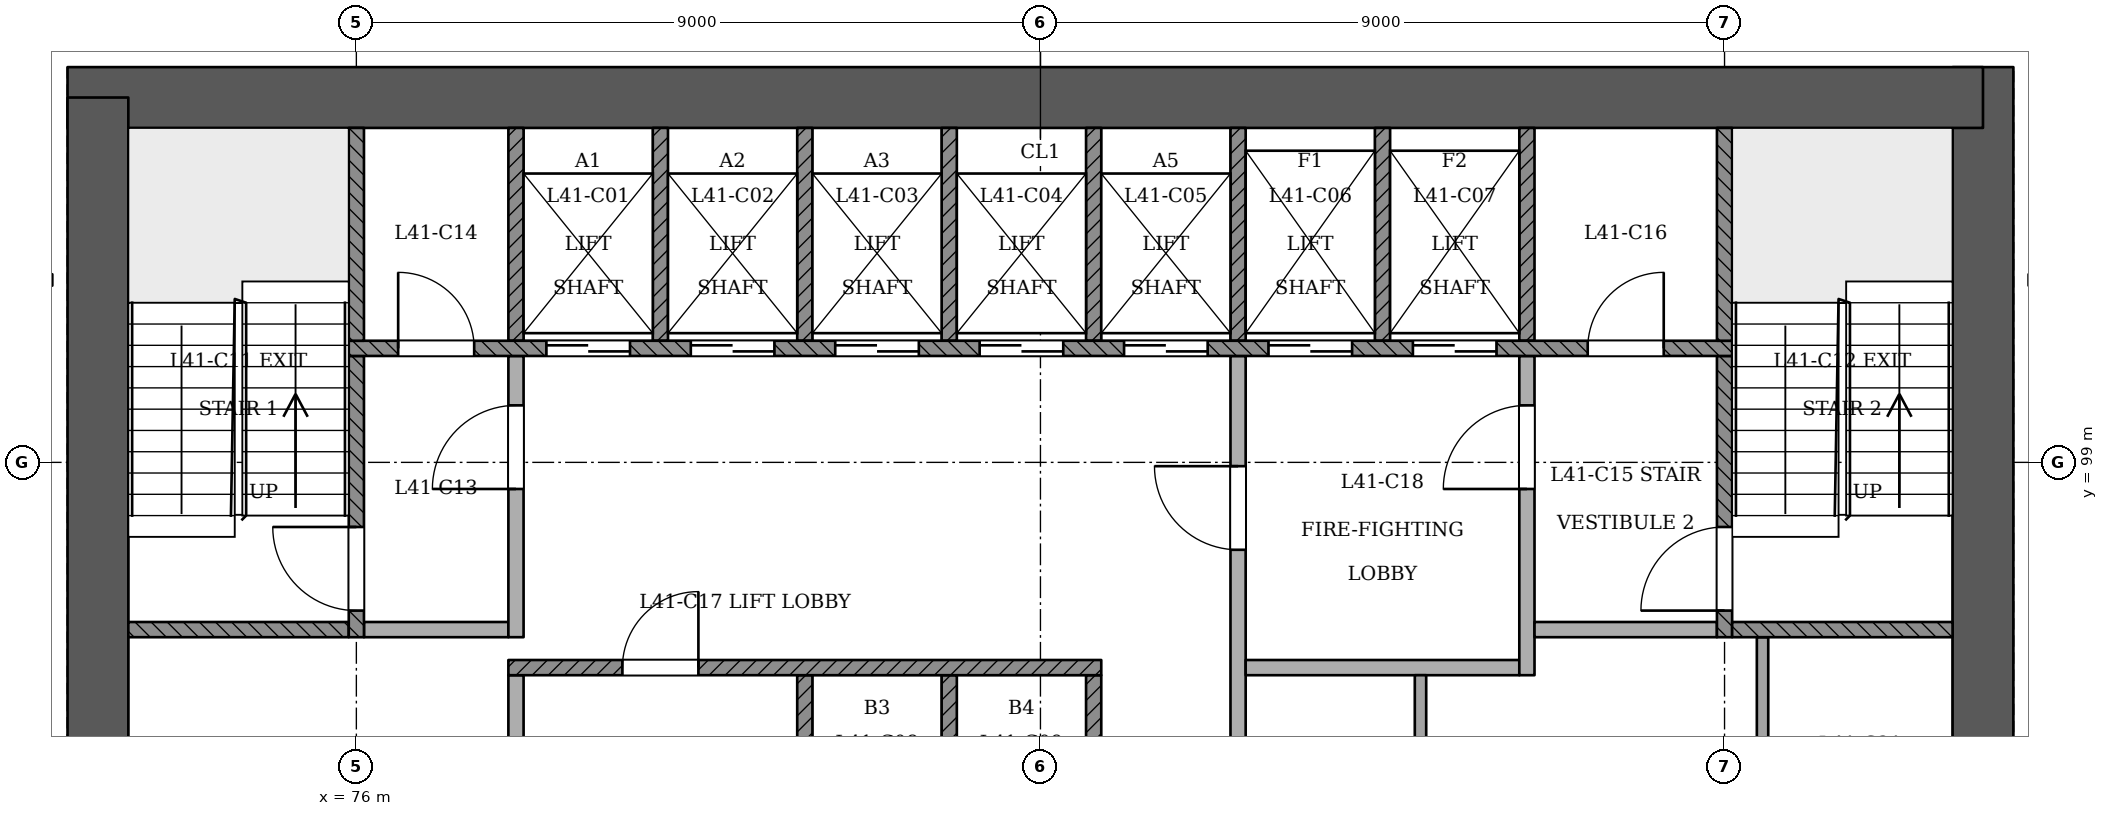
"""IFC4 building model, lengths in metres.
Left out: names, types, materials, properties, quantities, classifications, styles, units other than length and angle.
Written with IfcOpenShell. Run it as: python <this file> out.ifc"""

import sys

from ifc_helpers import new_model, si_unit, direction, frame, frame_2d, origin, place, context, subcontext, project, spatial, rectangle, extrude, element, fill, save


model = new_model("IFC4")
c1 = context("Model", 3, precision=1e-05, world=origin(), true_north=direction((0.0, 1.0)))
c2 = subcontext(c1, "Body", "Model", "MODEL_VIEW")
j1 = project(units=[si_unit("LENGTHUNIT", "METRE"), si_unit("PLANEANGLEUNIT", "RADIAN")], contexts=[c1])
p1 = place(None, origin())
s1 = spatial("IfcSite", under=j1, at=p1, CompositionType="ELEMENT")
p2 = place(p1, origin())
s2 = spatial("IfcBuilding", under=s1, at=p2, CompositionType="ELEMENT")
p3 = place(p2, frame((0.0, 0.0, 160.2)))
s3 = spatial("IfcBuildingStorey", under=s2, at=p3, CompositionType="ELEMENT", Elevation=160.2)
p4 = place(p3, frame((97.4, 93.0, 0.0), z_axis=(0.0, 0.0, 1.0), x_axis=(0.0, 1.0, 0.0)))
e1 = element("IfcWall", 1, at=p4, inside=s3, PredefinedType="SHEAR", context=c2, shape_type="SweptSolid", body=[
    extrude(rectangle(XDim=11.2, YDim=0.8, at=frame_2d((5.6, 0.0))), origin(), (0.0, 0.0, 1.0), 3.6),
])
p5 = place(p3, frame((97.4, 103.8, 0.0), z_axis=(0.0, 0.0, 1.0), x_axis=(-1.0, 0.0, 0.0)))
e2 = element("IfcWall", 2, at=p5, inside=s3, PredefinedType="SHEAR", context=c2, shape_type="SweptSolid", body=[
    extrude(rectangle(XDim=25.2, YDim=0.8, at=frame_2d((12.6, 0.0))), origin(), (0.0, 0.0, 1.0), 3.6),
])
p6 = place(p3, frame((72.6, 103.8, 0.0), z_axis=(0.0, 0.0, 1.0), x_axis=(0.0, -1.0, 0.0)))
e3 = element("IfcWall", 3, at=p6, inside=s3, PredefinedType="SHEAR", context=c2, shape_type="SweptSolid", body=[
    extrude(rectangle(XDim=11.2, YDim=0.8, at=frame_2d((5.6, 0.0))), origin(), (0.0, 0.0, 1.0), 3.6),
])
p7 = place(p3, frame((78.1, 93.4, 0.0), z_axis=(0.0, 0.0, 1.0), x_axis=(0.0, 1.0, 0.0)))
e4 = element("IfcWall", 4, at=p7, inside=s3, PredefinedType="PARTITIONING", context=c2, shape_type="SweptSolid", body=[
    extrude(rectangle(XDim=2.8, YDim=0.2, at=frame_2d((1.4, 0.0))), origin(), (0.0, 0.0, 1.0), 3.15),
])
for number, where, z_axis, x_axis in (
    (5, (81.9, 93.4, 0.0), (0.0, 0.0, 1.0), (0.0, 1.0, 0.0)),
    (6, (83.8, 93.4, 0.0), (0.0, 0.0, 1.0), (0.0, 1.0, 0.0)),
    (7, (85.7, 93.4, 0.0), (0.0, 0.0, 1.0), (0.0, 1.0, 0.0)),
):
    element("IfcWall", number, at=place(p3, frame(where, z_axis=z_axis, x_axis=x_axis)), inside=s3, PredefinedType="SOLIDWALL", context=c2, shape_type="SweptSolid", body=[
        extrude(rectangle(XDim=2.8, YDim=0.2, at=frame_2d((1.4, 0.0))), origin(), (0.0, 0.0, 1.0), 3.15),
    ])
p8 = place(p3, frame((87.6, 93.4, 0.0), z_axis=(0.0, 0.0, 1.0), x_axis=(0.0, 1.0, 0.0)))
e8 = element("IfcWall", 8, at=p8, inside=s3, PredefinedType="PARTITIONING", context=c2, shape_type="SweptSolid", body=[
    extrude(rectangle(XDim=7.0, YDim=0.2, at=frame_2d((3.5, 0.0))), origin(), (0.0, 0.0, 1.0), 3.15),
])
p9 = place(p8, frame((4.45, 0.0, 0.0)))
e9 = element("IfcOpeningElement", 9, at=p9, cuts=e8, PredefinedType="OPENING", context=c2, shape_type="SweptSolid", body=[
    extrude(rectangle(XDim=1.1, YDim=2.1, at=frame_2d((0.55, 1.05))), frame((0.0, 0.11, 0.0), z_axis=(0.0, -1.0, 0.0), x_axis=(1.0, 0.0, 0.0)), (0.0, 0.0, 1.0), 0.221),
])
p10 = place(p3, frame((90.0, 93.4, 0.0), z_axis=(0.0, 0.0, 1.0), x_axis=(0.0, 1.0, 0.0)))
e10 = element("IfcWall", 10, at=p10, inside=s3, PredefinedType="PARTITIONING", context=c2, shape_type="SweptSolid", body=[
    extrude(rectangle(XDim=2.8, YDim=0.15, at=frame_2d((1.4, 0.0))), origin(), (0.0, 0.0, 1.0), 3.15),
])
p11 = place(p3, frame((94.5, 93.4, 0.0), z_axis=(0.0, 0.0, 1.0), x_axis=(0.0, 1.0, 0.0)))
e11 = element("IfcWall", 11, at=p11, inside=s3, PredefinedType="PARTITIONING", context=c2, shape_type="SweptSolid", body=[
    extrude(rectangle(XDim=3.3, YDim=0.15, at=frame_2d((1.65, 0.0))), origin(), (0.0, 0.0, 1.0), 3.15),
])
p12 = place(p3, frame((78.0, 96.3, 0.0), z_axis=(0.0, 0.0, 1.0), x_axis=(1.0, 0.0, 0.0)))
e12 = element("IfcWall", 12, at=p12, inside=s3, PredefinedType="SOLIDWALL", context=c2, shape_type="SweptSolid", body=[
    extrude(rectangle(XDim=7.8, YDim=0.2, at=frame_2d((3.9, 0.0))), origin(), (0.0, 0.0, 1.0), 3.15),
])
p13 = place(p12, frame((1.5, 0.0, 0.0)))
e13 = element("IfcOpeningElement", 13, at=p13, cuts=e12, PredefinedType="OPENING", context=c2, shape_type="SweptSolid", body=[
    extrude(rectangle(XDim=1.0, YDim=2.1, at=frame_2d((0.5, 1.05))), frame((0.0, 0.11, 0.0), z_axis=(0.0, -1.0, 0.0), x_axis=(1.0, 0.0, 0.0)), (0.0, 0.0, 1.0), 0.221),
])
p14 = place(p3, frame((87.7, 96.3, 0.0), z_axis=(0.0, 0.0, 1.0), x_axis=(1.0, 0.0, 0.0)))
e14 = element("IfcWall", 14, at=p14, inside=s3, PredefinedType="PARTITIONING", context=c2, shape_type="SweptSolid", body=[
    extrude(rectangle(XDim=3.6, YDim=0.2, at=frame_2d((1.8, 0.0))), origin(), (0.0, 0.0, 1.0), 3.15),
])
p15 = place(p3, frame((91.4, 96.2, 0.0), z_axis=(0.0, 0.0, 1.0), x_axis=(0.0, 1.0, 0.0)))
e15 = element("IfcWall", 15, at=p15, inside=s3, PredefinedType="PARTITIONING", context=c2, shape_type="SweptSolid", body=[
    extrude(rectangle(XDim=4.2, YDim=0.2, at=frame_2d((2.1, 0.0))), origin(), (0.0, 0.0, 1.0), 3.15),
])
p16 = place(p15, frame((2.45, 0.0, 0.0)))
e16 = element("IfcOpeningElement", 16, at=p16, cuts=e15, PredefinedType="OPENING", context=c2, shape_type="SweptSolid", body=[
    extrude(rectangle(XDim=1.1, YDim=2.1, at=frame_2d((0.55, 1.05))), frame((0.0, 0.11, 0.0), z_axis=(0.0, -1.0, 0.0), x_axis=(1.0, 0.0, 0.0)), (0.0, 0.0, 1.0), 0.221),
])
p17 = place(p3, frame((73.0, 96.8, 0.0), z_axis=(0.0, 0.0, 1.0), x_axis=(1.0, 0.0, 0.0)))
e17 = element("IfcWall", 17, at=p17, inside=s3, PredefinedType="SOLIDWALL", context=c2, shape_type="SweptSolid", body=[
    extrude(rectangle(XDim=2.9, YDim=0.2, at=frame_2d((1.45, 0.0))), origin(), (0.0, 0.0, 1.0), 3.15),
])
p18 = place(p3, frame((76.0, 96.7, 0.0), z_axis=(0.0, 0.0, 1.0), x_axis=(0.0, 1.0, 0.0)))
e18 = element("IfcWall", 18, at=p18, inside=s3, PredefinedType="SOLIDWALL", context=c2, shape_type="SweptSolid", body=[
    extrude(rectangle(XDim=3.7, YDim=0.2, at=frame_2d((1.85, 0.0))), origin(), (0.0, 0.0, 1.0), 3.15),
])
p19 = place(p18, frame((0.35, 0.0, 0.0)))
e19 = element("IfcOpeningElement", 19, at=p19, cuts=e18, PredefinedType="OPENING", context=c2, shape_type="SweptSolid", body=[
    extrude(rectangle(XDim=1.1, YDim=2.1, at=frame_2d((0.55, 1.05))), frame((0.0, 0.11, 0.0), z_axis=(0.0, -1.0, 0.0), x_axis=(1.0, 0.0, 0.0)), (0.0, 0.0, 1.0), 0.221),
])
p20 = place(p3, frame((76.1, 96.8, 0.0), z_axis=(0.0, 0.0, 1.0), x_axis=(1.0, 0.0, 0.0)))
e20 = element("IfcWall", 20, at=p20, inside=s3, PredefinedType="PARTITIONING", context=c2, shape_type="SweptSolid", body=[
    extrude(rectangle(XDim=1.9, YDim=0.2, at=frame_2d((0.95, 0.0))), origin(), (0.0, 0.0, 1.0), 3.15),
])
p21 = place(p3, frame((78.1, 96.7, 0.0), z_axis=(0.0, 0.0, 1.0), x_axis=(0.0, 1.0, 0.0)))
e21 = element("IfcWall", 21, at=p21, inside=s3, PredefinedType="PARTITIONING", context=c2, shape_type="SweptSolid", body=[
    extrude(rectangle(XDim=3.7, YDim=0.2, at=frame_2d((1.85, 0.0))), origin(), (0.0, 0.0, 1.0), 3.15),
])
p22 = place(p21, frame((1.95, 0.0, 0.0)))
e22 = element("IfcOpeningElement", 22, at=p22, cuts=e21, PredefinedType="OPENING", context=c2, shape_type="SweptSolid", body=[
    extrude(rectangle(XDim=1.1, YDim=2.1, at=frame_2d((0.55, 1.05))), frame((0.0, 0.11, 0.0), z_axis=(0.0, -1.0, 0.0), x_axis=(1.0, 0.0, 0.0)), (0.0, 0.0, 1.0), 0.221),
])
p23 = place(p3, frame((91.5, 96.8, 0.0), z_axis=(0.0, 0.0, 1.0), x_axis=(1.0, 0.0, 0.0)))
e23 = element("IfcWall", 23, at=p23, inside=s3, PredefinedType="PARTITIONING", context=c2, shape_type="SweptSolid", body=[
    extrude(rectangle(XDim=2.4, YDim=0.2, at=frame_2d((1.2, 0.0))), origin(), (0.0, 0.0, 1.0), 3.15),
])
p24 = place(p3, frame((94.0, 96.7, 0.0), z_axis=(0.0, 0.0, 1.0), x_axis=(0.0, 1.0, 0.0)))
e24 = element("IfcWall", 24, at=p24, inside=s3, PredefinedType="SOLIDWALL", context=c2, shape_type="SweptSolid", body=[
    extrude(rectangle(XDim=3.7, YDim=0.2, at=frame_2d((1.85, 0.0))), origin(), (0.0, 0.0, 1.0), 3.15),
])
p25 = place(p24, frame((0.35, 0.0, 0.0)))
e25 = element("IfcOpeningElement", 25, at=p25, cuts=e24, PredefinedType="OPENING", context=c2, shape_type="SweptSolid", body=[
    extrude(rectangle(XDim=1.1, YDim=2.1, at=frame_2d((0.55, 1.05))), frame((0.0, 0.11, 0.0), z_axis=(0.0, -1.0, 0.0), x_axis=(1.0, 0.0, 0.0)), (0.0, 0.0, 1.0), 0.221),
])
p26 = place(p3, frame((94.1, 96.8, 0.0), z_axis=(0.0, 0.0, 1.0), x_axis=(1.0, 0.0, 0.0)))
e26 = element("IfcWall", 26, at=p26, inside=s3, PredefinedType="SOLIDWALL", context=c2, shape_type="SweptSolid", body=[
    extrude(rectangle(XDim=2.9, YDim=0.2, at=frame_2d((1.45, 0.0))), origin(), (0.0, 0.0, 1.0), 3.15),
])
p27 = place(p3, frame((75.9, 100.5, 0.0), z_axis=(0.0, 0.0, 1.0), x_axis=(1.0, 0.0, 0.0)))
e27 = element("IfcWall", 27, at=p27, inside=s3, PredefinedType="SOLIDWALL", context=c2, shape_type="SweptSolid", body=[
    extrude(rectangle(XDim=18.2, YDim=0.2, at=frame_2d((9.1, 0.0))), origin(), (0.0, 0.0, 1.0), 3.15),
])
p28 = place(p27, frame((2.6, 0.0, 0.0)))
e28 = element("IfcOpeningElement", 28, at=p28, cuts=e27, PredefinedType="OPENING", context=c2, shape_type="SweptSolid", body=[
    extrude(rectangle(XDim=1.1, YDim=2.1, at=frame_2d((0.55, 1.05))), frame((0.0, 0.11, 0.0), z_axis=(0.0, -1.0, 0.0), x_axis=(1.0, 0.0, 0.0)), (0.0, 0.0, 1.0), 0.221),
])
p29 = place(p27, frame((4.5, 0.0, 0.0)))
e29 = element("IfcOpeningElement", 29, at=p29, cuts=e27, PredefinedType="OPENING", context=c2, shape_type="SweptSolid", body=[
    extrude(rectangle(XDim=1.1, YDim=2.1, at=frame_2d((0.55, 1.05))), frame((0.0, 0.11, 0.0), z_axis=(0.0, -1.0, 0.0), x_axis=(1.0, 0.0, 0.0)), (0.0, 0.0, 1.0), 0.221),
])
p30 = place(p27, frame((6.4, 0.0, 0.0)))
e30 = element("IfcOpeningElement", 30, at=p30, cuts=e27, PredefinedType="OPENING", context=c2, shape_type="SweptSolid", body=[
    extrude(rectangle(XDim=1.1, YDim=2.1, at=frame_2d((0.55, 1.05))), frame((0.0, 0.11, 0.0), z_axis=(0.0, -1.0, 0.0), x_axis=(1.0, 0.0, 0.0)), (0.0, 0.0, 1.0), 0.221),
])
p31 = place(p27, frame((8.3, 0.0, 0.0)))
e31 = element("IfcOpeningElement", 31, at=p31, cuts=e27, PredefinedType="OPENING", context=c2, shape_type="SweptSolid", body=[
    extrude(rectangle(XDim=1.1, YDim=2.1, at=frame_2d((0.55, 1.05))), frame((0.0, 0.11, 0.0), z_axis=(0.0, -1.0, 0.0), x_axis=(1.0, 0.0, 0.0)), (0.0, 0.0, 1.0), 0.221),
])
p32 = place(p27, frame((10.2, 0.0, 0.0)))
e32 = element("IfcOpeningElement", 32, at=p32, cuts=e27, PredefinedType="OPENING", context=c2, shape_type="SweptSolid", body=[
    extrude(rectangle(XDim=1.1, YDim=2.1, at=frame_2d((0.55, 1.05))), frame((0.0, 0.11, 0.0), z_axis=(0.0, -1.0, 0.0), x_axis=(1.0, 0.0, 0.0)), (0.0, 0.0, 1.0), 0.221),
])
p33 = place(p27, frame((12.1, 0.0, 0.0)))
e33 = element("IfcOpeningElement", 33, at=p33, cuts=e27, PredefinedType="OPENING", context=c2, shape_type="SweptSolid", body=[
    extrude(rectangle(XDim=1.1, YDim=2.1, at=frame_2d((0.55, 1.05))), frame((0.0, 0.11, 0.0), z_axis=(0.0, -1.0, 0.0), x_axis=(1.0, 0.0, 0.0)), (0.0, 0.0, 1.0), 0.221),
])
p34 = place(p27, frame((14.0, 0.0, 0.0)))
e34 = element("IfcOpeningElement", 34, at=p34, cuts=e27, PredefinedType="OPENING", context=c2, shape_type="SweptSolid", body=[
    extrude(rectangle(XDim=1.1, YDim=2.1, at=frame_2d((0.55, 1.05))), frame((0.0, 0.11, 0.0), z_axis=(0.0, -1.0, 0.0), x_axis=(1.0, 0.0, 0.0)), (0.0, 0.0, 1.0), 0.221),
])
p35 = place(p27, frame((0.65, 0.0, 0.0)))
e35 = element("IfcOpeningElement", 35, at=p35, cuts=e27, PredefinedType="OPENING", context=c2, shape_type="SweptSolid", body=[
    extrude(rectangle(XDim=1.0, YDim=2.1, at=frame_2d((0.5, 1.05))), frame((0.0, 0.11, 0.0), z_axis=(0.0, -1.0, 0.0), x_axis=(1.0, 0.0, 0.0)), (0.0, 0.0, 1.0), 0.221),
])
p36 = place(p27, frame((16.3, 0.0, 0.0)))
e36 = element("IfcOpeningElement", 36, at=p36, cuts=e27, PredefinedType="OPENING", context=c2, shape_type="SweptSolid", body=[
    extrude(rectangle(XDim=1.0, YDim=2.1, at=frame_2d((0.5, 1.05))), frame((0.0, 0.11, 0.0), z_axis=(0.0, -1.0, 0.0), x_axis=(1.0, 0.0, 0.0)), (0.0, 0.0, 1.0), 0.221),
])
for number, where, z_axis, x_axis in (
    (37, (76.0, 100.6, 0.0), (0.0, 0.0, 1.0), (0.0, 1.0, 0.0)),
    (38, (78.1, 100.6, 0.0), (0.0, 0.0, 1.0), (0.0, 1.0, 0.0)),
    (39, (80.0, 100.6, 0.0), (0.0, 0.0, 1.0), (0.0, 1.0, 0.0)),
    (40, (81.9, 100.6, 0.0), (0.0, 0.0, 1.0), (0.0, 1.0, 0.0)),
    (41, (83.8, 100.6, 0.0), (0.0, 0.0, 1.0), (0.0, 1.0, 0.0)),
    (42, (85.7, 100.6, 0.0), (0.0, 0.0, 1.0), (0.0, 1.0, 0.0)),
    (43, (87.6, 100.6, 0.0), (0.0, 0.0, 1.0), (0.0, 1.0, 0.0)),
    (44, (89.5, 100.6, 0.0), (0.0, 0.0, 1.0), (0.0, 1.0, 0.0)),
    (45, (91.4, 100.6, 0.0), (0.0, 0.0, 1.0), (0.0, 1.0, 0.0)),
    (46, (94.0, 100.6, 0.0), (0.0, 0.0, 1.0), (0.0, 1.0, 0.0)),
):
    element("IfcWall", number, at=place(p3, frame(where, z_axis=z_axis, x_axis=x_axis)), inside=s3, PredefinedType="SOLIDWALL", context=c2, shape_type="SweptSolid", body=[
        extrude(rectangle(XDim=2.8, YDim=0.2, at=frame_2d((1.4, 0.0))), origin(), (0.0, 0.0, 1.0), 3.15),
    ])
p37 = place(p28, origin())
e47 = element("IfcDoor", 47, at=p37, inside=s3, OperationType="SLIDING_TO_RIGHT", PredefinedType="NOTDEFINED", context=c2, shape_type="SweptSolid", body=[
    extrude(rectangle(XDim=1.1, YDim=2.1, at=frame_2d((0.55, 1.05))), frame((0.0, 0.025, 0.0), z_axis=(0.0, -1.0, 0.0), x_axis=(1.0, 0.0, 0.0)), (0.0, 0.0, 1.0), 0.05),
])
fill(e28, e47)
p38 = place(p29, origin())
e48 = element("IfcDoor", 48, at=p38, inside=s3, OperationType="SLIDING_TO_LEFT", PredefinedType="NOTDEFINED", context=c2, shape_type="SweptSolid", body=[
    extrude(rectangle(XDim=1.1, YDim=2.1, at=frame_2d((0.55, 1.05))), frame((0.0, 0.025, 0.0), z_axis=(0.0, -1.0, 0.0), x_axis=(1.0, 0.0, 0.0)), (0.0, 0.0, 1.0), 0.05),
])
fill(e29, e48)
p39 = place(p30, origin())
e49 = element("IfcDoor", 49, at=p39, inside=s3, OperationType="SLIDING_TO_RIGHT", PredefinedType="NOTDEFINED", context=c2, shape_type="SweptSolid", body=[
    extrude(rectangle(XDim=1.1, YDim=2.1, at=frame_2d((0.55, 1.05))), frame((0.0, 0.025, 0.0), z_axis=(0.0, -1.0, 0.0), x_axis=(1.0, 0.0, 0.0)), (0.0, 0.0, 1.0), 0.05),
])
fill(e30, e49)
p40 = place(p31, origin())
e50 = element("IfcDoor", 50, at=p40, inside=s3, OperationType="SLIDING_TO_LEFT", PredefinedType="NOTDEFINED", context=c2, shape_type="SweptSolid", body=[
    extrude(rectangle(XDim=1.1, YDim=2.1, at=frame_2d((0.55, 1.05))), frame((0.0, 0.025, 0.0), z_axis=(0.0, -1.0, 0.0), x_axis=(1.0, 0.0, 0.0)), (0.0, 0.0, 1.0), 0.05),
])
fill(e31, e50)
p41 = place(p32, origin())
e51 = element("IfcDoor", 51, at=p41, inside=s3, OperationType="SLIDING_TO_RIGHT", PredefinedType="NOTDEFINED", context=c2, shape_type="SweptSolid", body=[
    extrude(rectangle(XDim=1.1, YDim=2.1, at=frame_2d((0.55, 1.05))), frame((0.0, 0.025, 0.0), z_axis=(0.0, -1.0, 0.0), x_axis=(1.0, 0.0, 0.0)), (0.0, 0.0, 1.0), 0.05),
])
fill(e32, e51)
p42 = place(p33, origin())
e52 = element("IfcDoor", 52, at=p42, inside=s3, OperationType="SLIDING_TO_RIGHT", PredefinedType="NOTDEFINED", context=c2, shape_type="SweptSolid", body=[
    extrude(rectangle(XDim=1.1, YDim=2.1, at=frame_2d((0.55, 1.05))), frame((0.0, 0.025, 0.0), z_axis=(0.0, -1.0, 0.0), x_axis=(1.0, 0.0, 0.0)), (0.0, 0.0, 1.0), 0.05),
])
fill(e33, e52)
p43 = place(p34, origin())
e53 = element("IfcDoor", 53, at=p43, inside=s3, OperationType="SLIDING_TO_LEFT", PredefinedType="NOTDEFINED", context=c2, shape_type="SweptSolid", body=[
    extrude(rectangle(XDim=1.1, YDim=2.1, at=frame_2d((0.55, 1.05))), frame((0.0, 0.025, 0.0), z_axis=(0.0, -1.0, 0.0), x_axis=(1.0, 0.0, 0.0)), (0.0, 0.0, 1.0), 0.05),
])
fill(e34, e53)
p44 = place(p19, origin())
e54 = element("IfcDoor", 54, at=p44, inside=s3, OperationType="SINGLE_SWING_RIGHT", PredefinedType="NOTDEFINED", context=c2, shape_type="SweptSolid", body=[
    extrude(rectangle(XDim=1.1, YDim=2.1, at=frame_2d((0.55, 1.05))), frame((0.0, 0.025, 0.0), z_axis=(0.0, -1.0, 0.0), x_axis=(1.0, 0.0, 0.0)), (0.0, 0.0, 1.0), 0.05),
])
fill(e19, e54)
p45 = place(p25, origin())
e55 = element("IfcDoor", 55, at=p45, inside=s3, OperationType="SINGLE_SWING_LEFT", PredefinedType="NOTDEFINED", context=c2, shape_type="SweptSolid", body=[
    extrude(rectangle(XDim=1.1, YDim=2.1, at=frame_2d((0.55, 1.05))), frame((0.0, 0.025, 0.0), z_axis=(0.0, -1.0, 0.0), x_axis=(1.0, 0.0, 0.0)), (0.0, 0.0, 1.0), 0.05),
])
fill(e25, e55)
p46 = place(p22, origin())
e56 = element("IfcDoor", 56, at=p46, inside=s3, OperationType="SINGLE_SWING_LEFT", PredefinedType="NOTDEFINED", context=c2, shape_type="SweptSolid", body=[
    extrude(rectangle(XDim=1.1, YDim=2.1, at=frame_2d((0.55, 1.05))), frame((0.0, 0.025, 0.0), z_axis=(0.0, -1.0, 0.0), x_axis=(1.0, 0.0, 0.0)), (0.0, 0.0, 1.0), 0.05),
])
fill(e22, e56)
p47 = place(p9, origin())
e57 = element("IfcDoor", 57, at=p47, inside=s3, OperationType="SINGLE_SWING_RIGHT", PredefinedType="NOTDEFINED", context=c2, shape_type="SweptSolid", body=[
    extrude(rectangle(XDim=1.1, YDim=2.1, at=frame_2d((0.55, 1.05))), frame((0.0, 0.025, 0.0), z_axis=(0.0, -1.0, 0.0), x_axis=(1.0, 0.0, 0.0)), (0.0, 0.0, 1.0), 0.05),
])
fill(e9, e57)
p48 = place(p16, origin())
e58 = element("IfcDoor", 58, at=p48, inside=s3, OperationType="SINGLE_SWING_LEFT", PredefinedType="NOTDEFINED", context=c2, shape_type="SweptSolid", body=[
    extrude(rectangle(XDim=1.1, YDim=2.1, at=frame_2d((0.55, 1.05))), frame((0.0, 0.025, 0.0), z_axis=(0.0, -1.0, 0.0), x_axis=(1.0, 0.0, 0.0)), (0.0, 0.0, 1.0), 0.05),
])
fill(e16, e58)
p49 = place(p35, origin())
e59 = element("IfcDoor", 59, at=p49, inside=s3, OperationType="SINGLE_SWING_LEFT", PredefinedType="NOTDEFINED", context=c2, shape_type="SweptSolid", body=[
    extrude(rectangle(XDim=1.0, YDim=2.1, at=frame_2d((0.5, 1.05))), frame((0.0, 0.025, 0.0), z_axis=(0.0, -1.0, 0.0), x_axis=(1.0, 0.0, 0.0)), (0.0, 0.0, 1.0), 0.05),
])
fill(e35, e59)
p50 = place(p36, origin())
e60 = element("IfcDoor", 60, at=p50, inside=s3, OperationType="SINGLE_SWING_RIGHT", PredefinedType="NOTDEFINED", context=c2, shape_type="SweptSolid", body=[
    extrude(rectangle(XDim=1.0, YDim=2.1, at=frame_2d((0.5, 1.05))), frame((0.0, 0.025, 0.0), z_axis=(0.0, -1.0, 0.0), x_axis=(1.0, 0.0, 0.0)), (0.0, 0.0, 1.0), 0.05),
])
fill(e36, e60)
p51 = place(p13, origin())
e61 = element("IfcDoor", 61, at=p51, inside=s3, OperationType="SINGLE_SWING_RIGHT", PredefinedType="NOTDEFINED", context=c2, shape_type="SweptSolid", body=[
    extrude(rectangle(XDim=1.0, YDim=2.1, at=frame_2d((0.5, 1.05))), frame((0.0, 0.025, 0.0), z_axis=(0.0, -1.0, 0.0), x_axis=(1.0, 0.0, 0.0)), (0.0, 0.0, 1.0), 0.05),
])
fill(e13, e61)
save(model, sys.argv[1])
